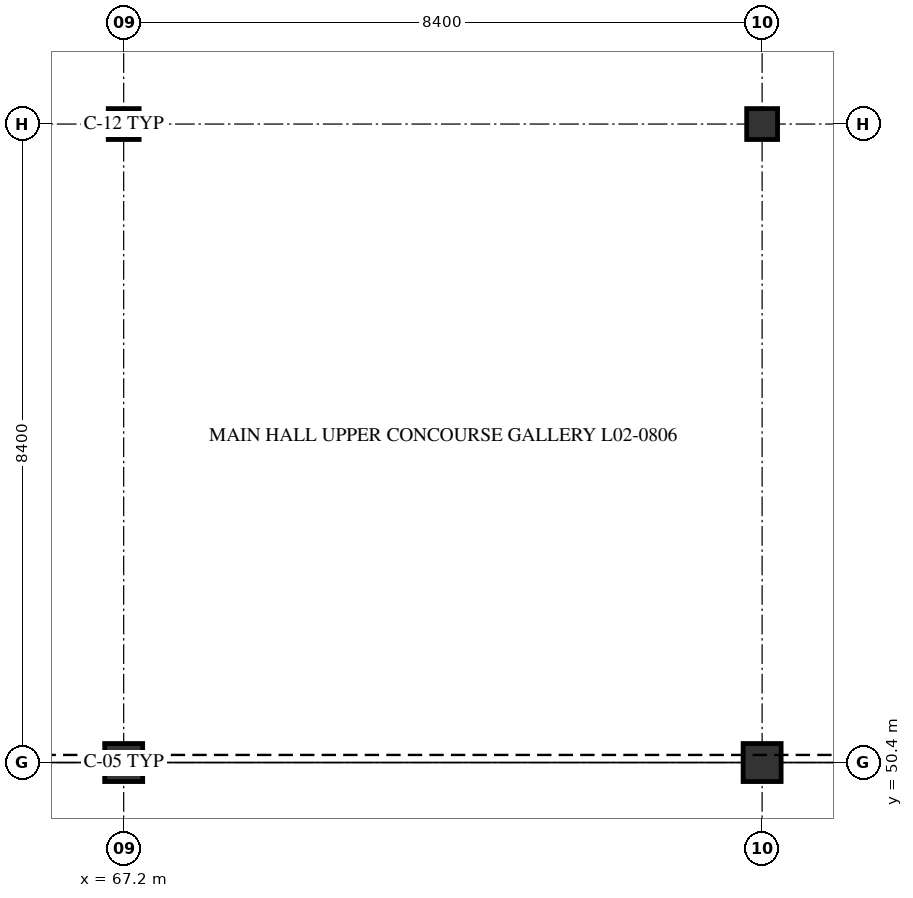
"""IFC4 building model, lengths in metres.
Left out: names, types, materials, properties, quantities, classifications, styles, units other than length and angle.
Written with IfcOpenShell. Run it as: python <this file> out.ifc"""

import sys

from ifc_helpers import new_model, si_unit, direction, frame, origin, origin_2d, place, context, subcontext, project, spatial, rectangle, hollow_circle, extrude, element, save


model = new_model("IFC4")
c1 = context("Model", 3, precision=1e-05, world=origin(), true_north=direction((0.0, 1.0)))
c2 = subcontext(c1, "Body", "Model", "MODEL_VIEW")
j1 = project(units=[si_unit("LENGTHUNIT", "METRE"), si_unit("PLANEANGLEUNIT", "RADIAN")], contexts=[c1])
p1 = place(None, origin())
s1 = spatial("IfcSite", under=j1, at=p1, CompositionType="ELEMENT")
p2 = place(p1, origin())
s2 = spatial("IfcBuilding", under=s1, at=p2, CompositionType="ELEMENT")
p3 = place(p2, frame((0.0, 0.0, 9.3)))
s3 = spatial("IfcBuildingStorey", under=s2, at=p3, CompositionType="ELEMENT", Elevation=9.3)
p4 = place(p3, frame((67.2, 50.4, 0.0), z_axis=(0.0, 0.0, 1.0), x_axis=(1.0, 0.0, 0.0)))
e1 = element("IfcColumn", 1, at=p4, inside=s3, PredefinedType="COLUMN", context=c2, shape_type="SweptSolid", body=[
    extrude(rectangle(XDim=0.5, YDim=0.5, at=origin_2d()), origin(), (0.0, 0.0, 1.0), 5.1),
])
p5 = place(p3, frame((67.2, 58.8, 0.0), z_axis=(0.0, 0.0, 1.0), x_axis=(1.0, 0.0, 0.0)))
e2 = element("IfcColumn", 2, at=p5, inside=s3, PredefinedType="COLUMN", context=c2, shape_type="SweptSolid", body=[
    extrude(hollow_circle(Radius=0.203, WallThickness=0.016, at=origin_2d()), origin(), (0.0, 0.0, 1.0), 5.1),
])
p6 = place(p3, frame((75.6, 50.4, 0.0), z_axis=(0.0, 0.0, 1.0), x_axis=(1.0, 0.0, 0.0)))
e3 = element("IfcColumn", 3, at=p6, inside=s3, PredefinedType="COLUMN", context=c2, shape_type="SweptSolid", body=[
    extrude(rectangle(XDim=0.5, YDim=0.5, at=origin_2d()), origin(), (0.0, 0.0, 1.0), 5.1),
])
p7 = place(p3, frame((75.6, 58.8, 0.0), z_axis=(0.0, 0.0, 1.0), x_axis=(1.0, 0.0, 0.0)))
e4 = element("IfcColumn", 4, at=p7, inside=s3, PredefinedType="COLUMN", context=c2, shape_type="SweptSolid", body=[
    extrude(hollow_circle(Radius=0.203, WallThickness=0.016, at=origin_2d()), origin(), (0.0, 0.0, 1.0), 5.1),
])
save(model, sys.argv[1])
